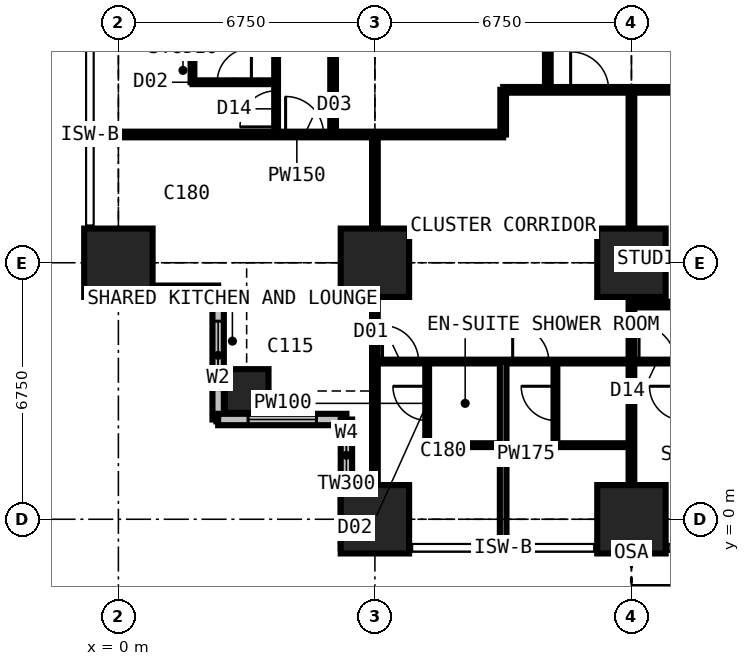
"""IFC4 building model, lengths in metres.
Left out: names, types, materials, properties, quantities, classifications, styles, units other than length and angle.
Written with IfcOpenShell. Run it as: python <this file> out.ifc"""

import sys

from ifc_helpers import new_model, si_unit, direction, frame, frame_2d, origin, origin_2d, place, context, subcontext, project, spatial, rectangle, extrude, element, fill, save


model = new_model("IFC4")
c1 = context("Model", 3, precision=1e-05, world=origin(), true_north=direction((0.0, 1.0)))
c2 = subcontext(c1, "Body", "Model", "MODEL_VIEW")
j1 = project(units=[si_unit("LENGTHUNIT", "METRE"), si_unit("PLANEANGLEUNIT", "RADIAN")], contexts=[c1])
p1 = place(None, origin())
s1 = spatial("IfcSite", under=j1, at=p1, CompositionType="ELEMENT")
p2 = place(p1, origin())
s2 = spatial("IfcBuilding", under=s1, at=p2, CompositionType="ELEMENT")
p3 = place(p2, frame((0.0, 0.0, 105.3)))
s3 = spatial("IfcBuildingStorey", under=s2, at=p3, CompositionType="ELEMENT", Elevation=105.3)
p4 = place(p3, frame((0.0, 6.75, 0.0), z_axis=(0.0, 0.0, 1.0), x_axis=(1.0, 0.0, 0.0)))
e1 = element("IfcColumn", 1, at=p4, inside=s3, PredefinedType="COLUMN", context=c2, shape_type="SweptSolid", body=[
    extrude(rectangle(XDim=1.8, YDim=1.8, at=origin_2d()), origin(), (0.0, 0.0, 1.0), 3.6),
])
p5 = place(p3, frame((3.375, 3.375, 0.0), z_axis=(0.0, 0.0, 1.0), x_axis=(1.0, 0.0, 0.0)))
e2 = element("IfcColumn", 2, at=p5, inside=s3, PredefinedType="COLUMN", context=c2, shape_type="SweptSolid", body=[
    extrude(rectangle(XDim=1.15, YDim=1.15, at=origin_2d()), origin(), (0.0, 0.0, 1.0), 3.6),
])
for number, where, z_axis, x_axis in (
    (3, (6.75, 0.0, 0.0), (0.0, 0.0, 1.0), (1.0, 0.0, 0.0)),
    (4, (6.75, 6.75, 0.0), (0.0, 0.0, 1.0), (1.0, 0.0, 0.0)),
    (5, (13.5, 0.0, 0.0), (0.0, 0.0, 1.0), (1.0, 0.0, 0.0)),
    (6, (13.5, 6.75, 0.0), (0.0, 0.0, 1.0), (1.0, 0.0, 0.0)),
):
    element("IfcColumn", number, at=place(p3, frame(where, z_axis=z_axis, x_axis=x_axis)), inside=s3, PredefinedType="COLUMN", context=c2, shape_type="SweptSolid", body=[
        extrude(rectangle(XDim=1.8, YDim=1.8, at=origin_2d()), origin(), (0.0, 0.0, 1.0), 3.6),
    ])
p6 = place(p3, frame((-0.75, 6.0, 0.0), z_axis=(0.0, 0.0, 1.0), x_axis=(1.0, 0.0, 0.0)))
e7 = element("IfcWall", 7, at=p6, inside=s3, PredefinedType="SOLIDWALL", context=c2, shape_type="SweptSolid", body=[
    extrude(rectangle(XDim=3.375, YDim=0.3, at=frame_2d((1.688, 0.0))), origin(), (0.0, 0.0, 1.0), 3.375),
])
p7 = place(p6, frame((1.833, 0.0, 0.9)))
e8 = element("IfcOpeningElement", 8, at=p7, cuts=e7, PredefinedType="OPENING", context=c2, shape_type="SweptSolid", body=[
    extrude(rectangle(XDim=1.2, YDim=1.8, at=frame_2d((0.6, 0.9))), frame((0.0, 0.16, 0.0), z_axis=(0.0, -1.0, 0.0), x_axis=(1.0, 0.0, 0.0)), (0.0, 0.0, 1.0), 0.32),
])
p8 = place(p3, frame((2.625, 6.0, 0.0), z_axis=(0.0, 0.0, 1.0), x_axis=(0.0, -1.0, 0.0)))
e9 = element("IfcWall", 9, at=p8, inside=s3, PredefinedType="SOLIDWALL", context=c2, shape_type="SweptSolid", body=[
    extrude(rectangle(XDim=3.375, YDim=0.3, at=frame_2d((1.688, 0.0))), origin(), (0.0, 0.0, 1.0), 3.375),
])
p9 = place(p8, frame((0.788, 0.0, 0.6)))
e10 = element("IfcOpeningElement", 10, at=p9, cuts=e9, PredefinedType="OPENING", context=c2, shape_type="SweptSolid", body=[
    extrude(rectangle(XDim=1.8, YDim=2.1, at=frame_2d((0.9, 1.05))), frame((0.0, 0.16, 0.0), z_axis=(0.0, -1.0, 0.0), x_axis=(1.0, 0.0, 0.0)), (0.0, 0.0, 1.0), 0.32),
])
p10 = place(p3, frame((2.625, 2.625, 0.0), z_axis=(0.0, 0.0, 1.0), x_axis=(1.0, 0.0, 0.0)))
e11 = element("IfcWall", 11, at=p10, inside=s3, PredefinedType="SOLIDWALL", context=c2, shape_type="SweptSolid", body=[
    extrude(rectangle(XDim=3.375, YDim=0.3, at=frame_2d((1.688, 0.0))), origin(), (0.0, 0.0, 1.0), 3.375),
])
p11 = place(p10, frame((0.788, 0.0, 0.6)))
e12 = element("IfcOpeningElement", 12, at=p11, cuts=e11, PredefinedType="OPENING", context=c2, shape_type="SweptSolid", body=[
    extrude(rectangle(XDim=1.8, YDim=2.1, at=frame_2d((0.9, 1.05))), frame((0.0, 0.16, 0.0), z_axis=(0.0, -1.0, 0.0), x_axis=(1.0, 0.0, 0.0)), (0.0, 0.0, 1.0), 0.32),
])
p12 = place(p3, frame((6.0, 2.625, 0.0), z_axis=(0.0, 0.0, 1.0), x_axis=(0.0, -1.0, 0.0)))
e13 = element("IfcWall", 13, at=p12, inside=s3, PredefinedType="SOLIDWALL", context=c2, shape_type="SweptSolid", body=[
    extrude(rectangle(XDim=3.375, YDim=0.3, at=frame_2d((1.688, 0.0))), origin(), (0.0, 0.0, 1.0), 3.375),
])
p13 = place(p12, frame((0.343, 0.0, 0.9)))
e14 = element("IfcOpeningElement", 14, at=p13, cuts=e13, PredefinedType="OPENING", context=c2, shape_type="SweptSolid", body=[
    extrude(rectangle(XDim=1.2, YDim=1.8, at=frame_2d((0.6, 0.9))), frame((0.0, 0.16, 0.0), z_axis=(0.0, -1.0, 0.0), x_axis=(1.0, 0.0, 0.0)), (0.0, 0.0, 1.0), 0.32),
])
p14 = place(p3, frame((-0.734, 10.125, 0.0), z_axis=(0.0, 0.0, 1.0), x_axis=(1.0, 0.0, 0.0)))
e15 = element("IfcWall", 15, at=p14, inside=s3, PredefinedType="PARTITIONING", context=c2, shape_type="SweptSolid", body=[
    extrude(rectangle(XDim=10.859, YDim=0.15, at=frame_2d((5.429, 0.0))), origin(), (0.0, 0.0, 1.0), 3.375),
])
p15 = place(p14, frame((5.134, 0.0, 0.0)))
e16 = element("IfcOpeningElement", 16, at=p15, cuts=e15, PredefinedType="OPENING", context=c2, shape_type="SweptSolid", body=[
    extrude(rectangle(XDim=1.0, YDim=2.2, at=frame_2d((0.5, 1.1))), frame((0.0, 0.085, 0.0), z_axis=(0.0, -1.0, 0.0), x_axis=(1.0, 0.0, 0.0)), (0.0, 0.0, 1.0), 0.17),
])
p16 = place(p3, frame((1.95, 11.5, 0.0), z_axis=(0.0, 0.0, 1.0), x_axis=(0.0, 1.0, 0.0)))
e17 = element("IfcWall", 17, at=p16, inside=s3, PredefinedType="PARTITIONING", context=c2, shape_type="SweptSolid", body=[
    extrude(rectangle(XDim=2.0, YDim=0.1, at=frame_2d((1.0, 0.0))), origin(), (0.0, 0.0, 1.0), 3.375),
])
p17 = place(p3, frame((1.95, 11.5, 0.0), z_axis=(0.0, 0.0, 1.0), x_axis=(1.0, 0.0, 0.0)))
e18 = element("IfcWall", 18, at=p17, inside=s3, PredefinedType="PARTITIONING", context=c2, shape_type="SweptSolid", body=[
    extrude(rectangle(XDim=2.2, YDim=0.1, at=frame_2d((1.1, 0.0))), origin(), (0.0, 0.0, 1.0), 3.375),
])
p18 = place(p17, frame((0.65, 0.0, 0.0)))
e19 = element("IfcOpeningElement", 19, at=p18, cuts=e18, PredefinedType="OPENING", context=c2, shape_type="SweptSolid", body=[
    extrude(rectangle(XDim=0.9, YDim=2.2, at=frame_2d((0.45, 1.1))), frame((0.0, 0.06, 0.0), z_axis=(0.0, -1.0, 0.0), x_axis=(1.0, 0.0, 0.0)), (0.0, 0.0, 1.0), 0.12),
])
p19 = place(p3, frame((4.15, 10.125, 0.0), z_axis=(0.0, 0.0, 1.0), x_axis=(0.0, 1.0, 0.0)))
e20 = element("IfcWall", 20, at=p19, inside=s3, PredefinedType="PARTITIONING", context=c2, shape_type="SweptSolid", body=[
    extrude(rectangle(XDim=16.875, YDim=0.1, at=frame_2d((8.438, 0.0))), origin(), (0.0, 0.0, 1.0), 3.375),
])
p20 = place(p19, frame((13.7, 0.0, 0.0)))
e21 = element("IfcOpeningElement", 21, at=p20, cuts=e20, PredefinedType="OPENING", context=c2, shape_type="SweptSolid", body=[
    extrude(rectangle(XDim=0.95, YDim=2.2, at=frame_2d((0.475, 1.1))), frame((0.0, 0.06, 0.0), z_axis=(0.0, -1.0, 0.0), x_axis=(1.0, 0.0, 0.0)), (0.0, 0.0, 1.0), 0.12),
])
p21 = place(p19, frame((0.2, 0.0, 0.0)))
e22 = element("IfcOpeningElement", 22, at=p21, cuts=e20, PredefinedType="OPENING", context=c2, shape_type="SweptSolid", body=[
    extrude(rectangle(XDim=0.95, YDim=2.2, at=frame_2d((0.475, 1.1))), frame((0.0, 0.06, 0.0), z_axis=(0.0, -1.0, 0.0), x_axis=(1.0, 0.0, 0.0)), (0.0, 0.0, 1.0), 0.12),
])
p22 = place(p19, frame((3.625, 0.0, 0.0)))
e23 = element("IfcOpeningElement", 23, at=p22, cuts=e20, PredefinedType="OPENING", context=c2, shape_type="SweptSolid", body=[
    extrude(rectangle(XDim=0.95, YDim=2.2, at=frame_2d((0.475, 1.1))), frame((0.0, 0.06, 0.0), z_axis=(0.0, -1.0, 0.0), x_axis=(1.0, 0.0, 0.0)), (0.0, 0.0, 1.0), 0.12),
])
p23 = place(p19, frame((7.0, 0.0, 0.0)))
e24 = element("IfcOpeningElement", 24, at=p23, cuts=e20, PredefinedType="OPENING", context=c2, shape_type="SweptSolid", body=[
    extrude(rectangle(XDim=0.95, YDim=2.2, at=frame_2d((0.475, 1.1))), frame((0.0, 0.06, 0.0), z_axis=(0.0, -1.0, 0.0), x_axis=(1.0, 0.0, 0.0)), (0.0, 0.0, 1.0), 0.12),
])
p24 = place(p19, frame((10.375, 0.0, 0.0)))
e25 = element("IfcOpeningElement", 25, at=p24, cuts=e20, PredefinedType="OPENING", context=c2, shape_type="SweptSolid", body=[
    extrude(rectangle(XDim=0.95, YDim=2.2, at=frame_2d((0.475, 1.1))), frame((0.0, 0.06, 0.0), z_axis=(0.0, -1.0, 0.0), x_axis=(1.0, 0.0, 0.0)), (0.0, 0.0, 1.0), 0.12),
])
p25 = place(p3, frame((5.65, 10.125, 0.0), z_axis=(0.0, 0.0, 1.0), x_axis=(0.0, 1.0, 0.0)))
e26 = element("IfcWall", 26, at=p25, inside=s3, PredefinedType="PARTITIONING", context=c2, shape_type="SweptSolid", body=[
    extrude(rectangle(XDim=10.762, YDim=0.15, at=frame_2d((5.381, 0.0))), origin(), (0.0, 0.0, 1.0), 3.375),
])
p26 = place(p25, frame((4.9, 0.0, 0.0)))
e27 = element("IfcOpeningElement", 27, at=p26, cuts=e26, PredefinedType="OPENING", context=c2, shape_type="SweptSolid", body=[
    extrude(rectangle(XDim=0.95, YDim=2.2, at=frame_2d((0.475, 1.1))), frame((0.0, 0.085, 0.0), z_axis=(0.0, -1.0, 0.0), x_axis=(1.0, 0.0, 0.0)), (0.0, 0.0, 1.0), 0.17),
])
p27 = place(p3, frame((6.75, -0.734, 0.0), z_axis=(0.0, 0.0, 1.0), x_axis=(0.0, 1.0, 0.0)))
e28 = element("IfcWall", 28, at=p27, inside=s3, PredefinedType="PARTITIONING", context=c2, shape_type="SweptSolid", body=[
    extrude(rectangle(XDim=10.859, YDim=0.15, at=frame_2d((5.429, 0.0))), origin(), (0.0, 0.0, 1.0), 2.877),
])
p28 = place(p3, frame((6.75, 4.15, 0.0), z_axis=(0.0, 0.0, 1.0), x_axis=(1.0, 0.0, 0.0)))
e29 = element("IfcWall", 29, at=p28, inside=s3, PredefinedType="PARTITIONING", context=c2, shape_type="SweptSolid", body=[
    extrude(rectangle(XDim=23.625, YDim=0.1, at=frame_2d((11.812, 0.0))), origin(), (0.0, 0.0, 1.0), 3.375),
])
p29 = place(p28, frame((0.2, 0.0, 0.0)))
e30 = element("IfcOpeningElement", 30, at=p29, cuts=e29, PredefinedType="OPENING", context=c2, shape_type="SweptSolid", body=[
    extrude(rectangle(XDim=0.95, YDim=2.2, at=frame_2d((0.475, 1.1))), frame((0.0, 0.06, 0.0), z_axis=(0.0, -1.0, 0.0), x_axis=(1.0, 0.0, 0.0)), (0.0, 0.0, 1.0), 0.12),
])
p30 = place(p28, frame((3.625, 0.0, 0.0)))
e31 = element("IfcOpeningElement", 31, at=p30, cuts=e29, PredefinedType="OPENING", context=c2, shape_type="SweptSolid", body=[
    extrude(rectangle(XDim=0.95, YDim=2.2, at=frame_2d((0.475, 1.1))), frame((0.0, 0.06, 0.0), z_axis=(0.0, -1.0, 0.0), x_axis=(1.0, 0.0, 0.0)), (0.0, 0.0, 1.0), 0.12),
])
p31 = place(p28, frame((6.95, 0.0, 0.0)))
e32 = element("IfcOpeningElement", 32, at=p31, cuts=e29, PredefinedType="OPENING", context=c2, shape_type="SweptSolid", body=[
    extrude(rectangle(XDim=0.95, YDim=2.2, at=frame_2d((0.475, 1.1))), frame((0.0, 0.06, 0.0), z_axis=(0.0, -1.0, 0.0), x_axis=(1.0, 0.0, 0.0)), (0.0, 0.0, 1.0), 0.12),
])
p32 = place(p28, frame((10.375, 0.0, 0.0)))
e33 = element("IfcOpeningElement", 33, at=p32, cuts=e29, PredefinedType="OPENING", context=c2, shape_type="SweptSolid", body=[
    extrude(rectangle(XDim=0.95, YDim=2.2, at=frame_2d((0.475, 1.1))), frame((0.0, 0.06, 0.0), z_axis=(0.0, -1.0, 0.0), x_axis=(1.0, 0.0, 0.0)), (0.0, 0.0, 1.0), 0.12),
])
p33 = place(p28, frame((13.75, 0.0, 0.0)))
e34 = element("IfcOpeningElement", 34, at=p33, cuts=e29, PredefinedType="OPENING", context=c2, shape_type="SweptSolid", body=[
    extrude(rectangle(XDim=0.95, YDim=2.2, at=frame_2d((0.475, 1.1))), frame((0.0, 0.06, 0.0), z_axis=(0.0, -1.0, 0.0), x_axis=(1.0, 0.0, 0.0)), (0.0, 0.0, 1.0), 0.12),
])
p34 = place(p28, frame((17.125, 0.0, 0.0)))
e35 = element("IfcOpeningElement", 35, at=p34, cuts=e29, PredefinedType="OPENING", context=c2, shape_type="SweptSolid", body=[
    extrude(rectangle(XDim=0.95, YDim=2.2, at=frame_2d((0.475, 1.1))), frame((0.0, 0.06, 0.0), z_axis=(0.0, -1.0, 0.0), x_axis=(1.0, 0.0, 0.0)), (0.0, 0.0, 1.0), 0.12),
])
p35 = place(p28, frame((20.5, 0.0, 0.0)))
e36 = element("IfcOpeningElement", 36, at=p35, cuts=e29, PredefinedType="OPENING", context=c2, shape_type="SweptSolid", body=[
    extrude(rectangle(XDim=0.95, YDim=2.2, at=frame_2d((0.475, 1.1))), frame((0.0, 0.06, 0.0), z_axis=(0.0, -1.0, 0.0), x_axis=(1.0, 0.0, 0.0)), (0.0, 0.0, 1.0), 0.12),
])
p36 = place(p3, frame((8.125, 1.95, 0.0), z_axis=(0.0, 0.0, 1.0), x_axis=(0.0, 1.0, 0.0)))
e37 = element("IfcWall", 37, at=p36, inside=s3, PredefinedType="PARTITIONING", context=c2, shape_type="SweptSolid", body=[
    extrude(rectangle(XDim=2.2, YDim=0.1, at=frame_2d((1.1, 0.0))), origin(), (0.0, 0.0, 1.0), 3.375),
])
p37 = place(p36, frame((0.65, 0.0, 0.0)))
e38 = element("IfcOpeningElement", 38, at=p37, cuts=e37, PredefinedType="OPENING", context=c2, shape_type="SweptSolid", body=[
    extrude(rectangle(XDim=0.9, YDim=2.2, at=frame_2d((0.45, 1.1))), frame((0.0, 0.06, 0.0), z_axis=(0.0, -1.0, 0.0), x_axis=(1.0, 0.0, 0.0)), (0.0, 0.0, 1.0), 0.12),
])
p38 = place(p3, frame((8.125, 1.95, 0.0), z_axis=(0.0, 0.0, 1.0), x_axis=(1.0, 0.0, 0.0)))
e39 = element("IfcWall", 39, at=p38, inside=s3, PredefinedType="PARTITIONING", context=c2, shape_type="SweptSolid", body=[
    extrude(rectangle(XDim=2.0, YDim=0.1, at=frame_2d((1.0, 0.0))), origin(), (0.0, 0.0, 1.0), 3.375),
])
p39 = place(p3, frame((10.125, -0.734, 0.0), z_axis=(0.0, 0.0, 1.0), x_axis=(0.0, 1.0, 0.0)))
e40 = element("IfcWall", 40, at=p39, inside=s3, PredefinedType="PARTITIONING", context=c2, shape_type="SweptSolid", body=[
    extrude(rectangle(XDim=4.884, YDim=0.175, at=frame_2d((2.442, 0.0))), origin(), (0.0, 0.0, 1.0), 3.375),
])
p40 = place(p3, frame((10.125, 10.125, 0.0), z_axis=(0.0, 0.0, 1.0), x_axis=(0.0, 1.0, 0.0)))
e41 = element("IfcWall", 41, at=p40, inside=s3, PredefinedType="PARTITIONING", context=c2, shape_type="SweptSolid", body=[
    extrude(rectangle(XDim=1.175, YDim=0.15, at=frame_2d((0.587, 0.0))), origin(), (0.0, 0.0, 1.0), 3.375),
])
p41 = place(p3, frame((10.125, 11.3, 0.0), z_axis=(0.0, 0.0, 1.0), x_axis=(1.0, 0.0, 0.0)))
e42 = element("IfcWall", 42, at=p41, inside=s3, PredefinedType="PARTITIONING", context=c2, shape_type="SweptSolid", body=[
    extrude(rectangle(XDim=20.675, YDim=0.15, at=frame_2d((10.337, 0.0))), origin(), (0.0, 0.0, 1.0), 3.375),
])
p42 = place(p41, frame((1.775, 0.0, 0.0)))
e43 = element("IfcOpeningElement", 43, at=p42, cuts=e42, PredefinedType="OPENING", context=c2, shape_type="SweptSolid", body=[
    extrude(rectangle(XDim=1.0, YDim=2.2, at=frame_2d((0.5, 1.1))), frame((0.0, 0.085, 0.0), z_axis=(0.0, -1.0, 0.0), x_axis=(1.0, 0.0, 0.0)), (0.0, 0.0, 1.0), 0.17),
])
p43 = place(p41, frame((11.312, 0.0, 0.0)))
e44 = element("IfcOpeningElement", 44, at=p43, cuts=e42, PredefinedType="OPENING", context=c2, shape_type="SweptSolid", body=[
    extrude(rectangle(XDim=1.0, YDim=2.2, at=frame_2d((0.5, 1.1))), frame((0.0, 0.085, 0.0), z_axis=(0.0, -1.0, 0.0), x_axis=(1.0, 0.0, 0.0)), (0.0, 0.0, 1.0), 0.17),
])
p44 = place(p3, frame((11.3, 11.3, 0.0), z_axis=(0.0, 0.0, 1.0), x_axis=(0.0, 1.0, 0.0)))
e45 = element("IfcWall", 45, at=p44, inside=s3, PredefinedType="PARTITIONING", context=c2, shape_type="SweptSolid", body=[
    extrude(rectangle(XDim=19.3, YDim=0.15, at=frame_2d((9.65, 0.0))), origin(), (0.0, 0.0, 1.0), 3.375),
])
p45 = place(p44, frame((13.525, 0.0, 0.0)))
e46 = element("IfcOpeningElement", 46, at=p45, cuts=e45, PredefinedType="OPENING", context=c2, shape_type="SweptSolid", body=[
    extrude(rectangle(XDim=1.0, YDim=2.2, at=frame_2d((0.5, 1.1))), frame((0.0, 0.085, 0.0), z_axis=(0.0, -1.0, 0.0), x_axis=(1.0, 0.0, 0.0)), (0.0, 0.0, 1.0), 0.17),
])
p46 = place(p44, frame((10.438, 0.0, 0.0)))
e47 = element("IfcOpeningElement", 47, at=p46, cuts=e45, PredefinedType="OPENING", context=c2, shape_type="SweptSolid", body=[
    extrude(rectangle(XDim=1.0, YDim=2.2, at=frame_2d((0.5, 1.1))), frame((0.0, 0.085, 0.0), z_axis=(0.0, -1.0, 0.0), x_axis=(1.0, 0.0, 0.0)), (0.0, 0.0, 1.0), 0.17),
])
p47 = place(p3, frame((11.5, 1.95, 0.0), z_axis=(0.0, 0.0, 1.0), x_axis=(0.0, 1.0, 0.0)))
e48 = element("IfcWall", 48, at=p47, inside=s3, PredefinedType="PARTITIONING", context=c2, shape_type="SweptSolid", body=[
    extrude(rectangle(XDim=2.2, YDim=0.1, at=frame_2d((1.1, 0.0))), origin(), (0.0, 0.0, 1.0), 3.375),
])
p48 = place(p47, frame((0.65, 0.0, 0.0)))
e49 = element("IfcOpeningElement", 49, at=p48, cuts=e48, PredefinedType="OPENING", context=c2, shape_type="SweptSolid", body=[
    extrude(rectangle(XDim=0.9, YDim=2.2, at=frame_2d((0.45, 1.1))), frame((0.0, 0.06, 0.0), z_axis=(0.0, -1.0, 0.0), x_axis=(1.0, 0.0, 0.0)), (0.0, 0.0, 1.0), 0.12),
])
p49 = place(p3, frame((11.5, 1.95, 0.0), z_axis=(0.0, 0.0, 1.0), x_axis=(1.0, 0.0, 0.0)))
e50 = element("IfcWall", 50, at=p49, inside=s3, PredefinedType="PARTITIONING", context=c2, shape_type="SweptSolid", body=[
    extrude(rectangle(XDim=2.0, YDim=0.1, at=frame_2d((1.0, 0.0))), origin(), (0.0, 0.0, 1.0), 3.375),
])
p50 = place(p3, frame((13.5, -0.734, 0.0), z_axis=(0.0, 0.0, 1.0), x_axis=(0.0, 1.0, 0.0)))
e51 = element("IfcWall", 51, at=p50, inside=s3, PredefinedType="PARTITIONING", context=c2, shape_type="SweptSolid", body=[
    extrude(rectangle(XDim=12.034, YDim=0.15, at=frame_2d((6.017, 0.0))), origin(), (0.0, 0.0, 1.0), 2.61),
])
p51 = place(p3, frame((13.5, 5.65, 0.0), z_axis=(0.0, 0.0, 1.0), x_axis=(1.0, 0.0, 0.0)))
e52 = element("IfcWall", 52, at=p51, inside=s3, PredefinedType="PARTITIONING", context=c2, shape_type="SweptSolid", body=[
    extrude(rectangle(XDim=7.387, YDim=0.15, at=frame_2d((3.694, 0.0))), origin(), (0.0, 0.0, 1.0), 3.375),
])
p52 = place(p51, frame((3.2, 0.0, 0.0)))
e53 = element("IfcOpeningElement", 53, at=p52, cuts=e52, PredefinedType="OPENING", context=c2, shape_type="SweptSolid", body=[
    extrude(rectangle(XDim=0.95, YDim=2.2, at=frame_2d((0.475, 1.1))), frame((0.0, 0.085, 0.0), z_axis=(0.0, -1.0, 0.0), x_axis=(1.0, 0.0, 0.0)), (0.0, 0.0, 1.0), 0.17),
])
p53 = place(p7, origin())
e54 = element("IfcWindow", 54, at=p53, inside=s3, PartitioningType="SINGLE_PANEL", PredefinedType="WINDOW", context=c2, shape_type="SweptSolid", body=[
    extrude(rectangle(XDim=1.2, YDim=1.8, at=frame_2d((0.6, 0.9))), frame((0.0, 0.03, 0.0), z_axis=(0.0, -1.0, 0.0), x_axis=(1.0, 0.0, 0.0)), (0.0, 0.0, 1.0), 0.06),
])
fill(e8, e54)
p54 = place(p9, origin())
e55 = element("IfcWindow", 55, at=p54, inside=s3, PartitioningType="SINGLE_PANEL", PredefinedType="WINDOW", context=c2, shape_type="SweptSolid", body=[
    extrude(rectangle(XDim=1.8, YDim=2.1, at=frame_2d((0.9, 1.05))), frame((0.0, 0.03, 0.0), z_axis=(0.0, -1.0, 0.0), x_axis=(1.0, 0.0, 0.0)), (0.0, 0.0, 1.0), 0.06),
])
fill(e10, e55)
p55 = place(p11, origin())
e56 = element("IfcWindow", 56, at=p55, inside=s3, PartitioningType="SINGLE_PANEL", PredefinedType="WINDOW", context=c2, shape_type="SweptSolid", body=[
    extrude(rectangle(XDim=1.8, YDim=2.1, at=frame_2d((0.9, 1.05))), frame((0.0, 0.03, 0.0), z_axis=(0.0, -1.0, 0.0), x_axis=(1.0, 0.0, 0.0)), (0.0, 0.0, 1.0), 0.06),
])
fill(e12, e56)
p56 = place(p13, origin())
e57 = element("IfcWindow", 57, at=p56, inside=s3, PartitioningType="SINGLE_PANEL", PredefinedType="WINDOW", context=c2, shape_type="SweptSolid", body=[
    extrude(rectangle(XDim=1.2, YDim=1.8, at=frame_2d((0.6, 0.9))), frame((0.0, 0.03, 0.0), z_axis=(0.0, -1.0, 0.0), x_axis=(1.0, 0.0, 0.0)), (0.0, 0.0, 1.0), 0.06),
])
fill(e14, e57)
p57 = place(p15, origin())
e58 = element("IfcDoor", 58, at=p57, inside=s3, OperationType="SINGLE_SWING_LEFT", PredefinedType="DOOR", context=c2, shape_type="SweptSolid", body=[
    extrude(rectangle(XDim=1.0, YDim=2.2, at=frame_2d((0.5, 1.1))), frame((0.0, 0.025, 0.0), z_axis=(0.0, -1.0, 0.0), x_axis=(1.0, 0.0, 0.0)), (0.0, 0.0, 1.0), 0.05),
])
fill(e16, e58)
p58 = place(p29, origin())
e59 = element("IfcDoor", 59, at=p58, inside=s3, OperationType="SINGLE_SWING_LEFT", PredefinedType="DOOR", context=c2, shape_type="SweptSolid", body=[
    extrude(rectangle(XDim=0.95, YDim=2.2, at=frame_2d((0.475, 1.1))), frame((0.0, 0.025, 0.0), z_axis=(0.0, -1.0, 0.0), x_axis=(1.0, 0.0, 0.0)), (0.0, 0.0, 1.0), 0.05),
])
fill(e30, e59)
p59 = place(p37, origin())
e60 = element("IfcDoor", 60, at=p59, inside=s3, OperationType="SINGLE_SWING_RIGHT", PredefinedType="DOOR", context=c2, shape_type="SweptSolid", body=[
    extrude(rectangle(XDim=0.9, YDim=2.2, at=frame_2d((0.45, 1.1))), frame((0.0, 0.025, 0.0), z_axis=(0.0, -1.0, 0.0), x_axis=(1.0, 0.0, 0.0)), (0.0, 0.0, 1.0), 0.05),
])
fill(e38, e60)
p60 = place(p30, origin())
e61 = element("IfcDoor", 61, at=p60, inside=s3, OperationType="SINGLE_SWING_LEFT", PredefinedType="DOOR", context=c2, shape_type="SweptSolid", body=[
    extrude(rectangle(XDim=0.95, YDim=2.2, at=frame_2d((0.475, 1.1))), frame((0.0, 0.025, 0.0), z_axis=(0.0, -1.0, 0.0), x_axis=(1.0, 0.0, 0.0)), (0.0, 0.0, 1.0), 0.05),
])
fill(e31, e61)
p61 = place(p48, origin())
e62 = element("IfcDoor", 62, at=p61, inside=s3, OperationType="SINGLE_SWING_RIGHT", PredefinedType="DOOR", context=c2, shape_type="SweptSolid", body=[
    extrude(rectangle(XDim=0.9, YDim=2.2, at=frame_2d((0.45, 1.1))), frame((0.0, 0.025, 0.0), z_axis=(0.0, -1.0, 0.0), x_axis=(1.0, 0.0, 0.0)), (0.0, 0.0, 1.0), 0.05),
])
fill(e49, e62)
p62 = place(p42, origin())
e63 = element("IfcDoor", 63, at=p62, inside=s3, OperationType="SINGLE_SWING_LEFT", PredefinedType="DOOR", context=c2, shape_type="SweptSolid", body=[
    extrude(rectangle(XDim=1.0, YDim=2.2, at=frame_2d((0.5, 1.1))), frame((0.0, 0.025, 0.0), z_axis=(0.0, -1.0, 0.0), x_axis=(1.0, 0.0, 0.0)), (0.0, 0.0, 1.0), 0.05),
])
fill(e43, e63)
p63 = place(p31, origin())
e64 = element("IfcDoor", 64, at=p63, inside=s3, OperationType="SINGLE_SWING_LEFT", PredefinedType="DOOR", context=c2, shape_type="SweptSolid", body=[
    extrude(rectangle(XDim=0.95, YDim=2.2, at=frame_2d((0.475, 1.1))), frame((0.0, 0.025, 0.0), z_axis=(0.0, -1.0, 0.0), x_axis=(1.0, 0.0, 0.0)), (0.0, 0.0, 1.0), 0.05),
])
fill(e32, e64)
p64 = place(p21, origin())
e65 = element("IfcDoor", 65, at=p64, inside=s3, OperationType="SINGLE_SWING_LEFT", PredefinedType="DOOR", context=c2, shape_type="SweptSolid", body=[
    extrude(rectangle(XDim=0.95, YDim=2.2, at=frame_2d((0.475, 1.1))), frame((0.0, 0.025, 0.0), z_axis=(0.0, -1.0, 0.0), x_axis=(1.0, 0.0, 0.0)), (0.0, 0.0, 1.0), 0.05),
])
fill(e22, e65)
p65 = place(p18, origin())
e66 = element("IfcDoor", 66, at=p65, inside=s3, OperationType="SINGLE_SWING_RIGHT", PredefinedType="DOOR", context=c2, shape_type="SweptSolid", body=[
    extrude(rectangle(XDim=0.9, YDim=2.2, at=frame_2d((0.45, 1.1))), frame((0.0, 0.025, 0.0), z_axis=(0.0, -1.0, 0.0), x_axis=(1.0, 0.0, 0.0)), (0.0, 0.0, 1.0), 0.05),
])
fill(e19, e66)
save(model, sys.argv[1])
